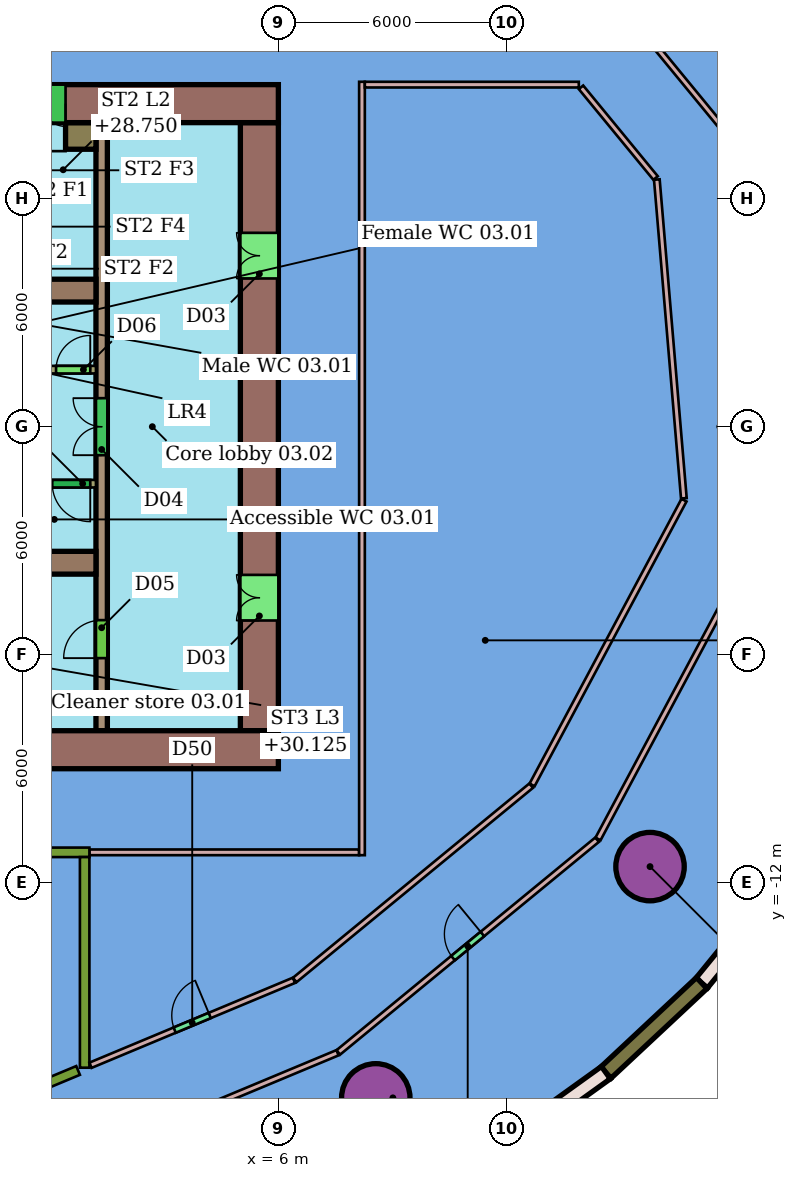
"""IFC4 building model, lengths in metres.
Left out: names, types, materials, properties, quantities, classifications, styles, units other than length and angle.
Written with IfcOpenShell. Run it as: python <this file> out.ifc"""

import sys

from ifc_helpers import new_model, si_unit, direction, frame, frame_2d, origin, origin_2d, place, context, subcontext, project, spatial, rectangle, hollow_circle, extrude, element, fill, save


model = new_model("IFC4")
c1 = context("Model", 3, precision=1e-05, world=origin(), true_north=direction((0.0, 1.0)))
c2 = subcontext(c1, "Body", "Model", "MODEL_VIEW")
j1 = project(units=[si_unit("LENGTHUNIT", "METRE"), si_unit("PLANEANGLEUNIT", "RADIAN")], contexts=[c1])
p1 = place(None, origin())
s1 = spatial("IfcSite", under=j1, at=p1, CompositionType="ELEMENT")
p2 = place(p1, origin())
s2 = spatial("IfcBuilding", under=s1, at=p2, CompositionType="ELEMENT")
p3 = place(p2, frame((0.0, 0.0, 26.0)))
s3 = spatial("IfcBuildingStorey", under=s2, at=p3, CompositionType="ELEMENT", Elevation=26.0)
for number, where, z_axis, x_axis in (
    (1, (8.563, -17.66, 0.0), (0.0, 0.0, 1.0), (1.0, 0.0, 0.0)),
    (2, (15.78, -11.576, 0.0), (0.0, 0.0, 1.0), (1.0, 0.0, 0.0)),
):
    element("IfcColumn", number, at=place(p3, frame(where, z_axis=z_axis, x_axis=x_axis)), inside=s3, PredefinedType="COLUMN", context=c2, shape_type="SweptSolid", body=[
        extrude(hollow_circle(Radius=0.9, WallThickness=0.06, at=origin_2d()), origin(), (0.0, 0.0, 1.0), 5.3),
    ])
p4 = place(p3, frame((1.027, -11.2, 0.0), z_axis=(0.0, 0.0, 1.0), x_axis=(1.0, 0.0, 0.0)))
e3 = element("IfcWall", 3, at=p4, inside=s3, PredefinedType="PARTITIONING", context=c2, shape_type="SweptSolid", body=[
    extrude(rectangle(XDim=7.098, YDim=0.15, at=frame_2d((3.549, 0.0))), origin(), (0.0, 0.0, 1.0), 4.6),
])
p5 = place(p3, frame((-8.223, -11.2, 0.0), z_axis=(0.0, 0.0, 1.0), x_axis=(1.0, 0.0, 0.0)))
e4 = element("IfcWall", 4, at=p5, inside=s3, PredefinedType="PARTITIONING", context=c2, shape_type="SweptSolid", body=[
    extrude(rectangle(XDim=9.25, YDim=0.25, at=frame_2d((4.625, 0.0))), origin(), (0.0, 0.0, 1.0), 4.6),
])
p6 = place(p3, frame((8.2, -11.275, 0.0), z_axis=(0.0, 0.0, 1.0), x_axis=(0.0, 1.0, 0.0)))
e5 = element("IfcWall", 5, at=p6, inside=s3, PredefinedType="PARTITIONING", context=c2, shape_type="SweptSolid", body=[
    extrude(rectangle(XDim=20.35, YDim=0.15, at=frame_2d((10.175, 0.0))), origin(), (0.0, 0.0, 1.0), 4.6),
])
p7 = place(p3, frame((8.275, 9.0, 0.0), z_axis=(0.0, 0.0, 1.0), x_axis=(1.0, 0.0, 0.0)))
e6 = element("IfcWall", 6, at=p7, inside=s3, PredefinedType="PARTITIONING", context=c2, shape_type="SweptSolid", body=[
    extrude(rectangle(XDim=5.631, YDim=0.15, at=frame_2d((2.815, 0.0))), origin(), (0.0, 0.0, 1.0), 4.6),
])
p8 = place(p3, frame((13.964, 8.929, 0.0), z_axis=(0.0, 0.0, 1.0), x_axis=(0.635017397711, -0.772497834692, 0.0)))
e7 = element("IfcWall", 7, at=p8, inside=s3, PredefinedType="PARTITIONING", context=c2, shape_type="SweptSolid", body=[
    extrude(rectangle(XDim=3.09, YDim=0.15, at=frame_2d((1.545, 0.0))), origin(), (0.0, 0.0, 1.0), 4.6),
])
p9 = place(p3, frame((0.903, -16.867, 0.0), z_axis=(0.0, 0.0, 1.0), x_axis=(0.0, 1.0, 0.0)))
e8 = element("IfcWall", 8, at=p9, inside=s3, PredefinedType="PARTITIONING", context=c2, shape_type="SweptSolid", body=[
    extrude(rectangle(XDim=5.542, YDim=0.25, at=frame_2d((2.771, 0.0))), origin(), (0.0, 0.0, 1.0), 4.6),
])
p10 = place(p3, frame((-0.52, -17.461, 0.0), z_axis=(0.0, 0.0, 1.0), x_axis=(0.922788606811, 0.38530661445, 0.0)))
e9 = element("IfcWall", 9, at=p10, inside=s3, PredefinedType="PARTITIONING", context=c2, shape_type="SweptSolid", body=[
    extrude(rectangle(XDim=1.354, YDim=0.25, at=frame_2d((0.677, 0.0))), origin(), (0.0, 0.0, 1.0), 4.6),
])
p11 = place(p3, frame((1.057, -16.802, 0.0), z_axis=(0.0, 0.0, 1.0), x_axis=(0.922820205479, 0.385230928612, 0.0)))
e10 = element("IfcWall", 10, at=p11, inside=s3, PredefinedType="PARTITIONING", context=c2, shape_type="SweptSolid", body=[
    extrude(rectangle(XDim=5.801, YDim=0.15, at=frame_2d((2.9, 0.0))), origin(), (0.0, 0.0, 1.0), 4.6),
])
p12 = place(p11, frame((2.4, 0.0, 0.0)))
e11 = element("IfcOpeningElement", 11, at=p12, cuts=e10, PredefinedType="OPENING", context=c2, shape_type="SweptSolid", body=[
    extrude(rectangle(XDim=1.0, YDim=2.1, at=frame_2d((0.5, 1.05))), frame((0.0, 0.085, 0.0), z_axis=(0.0, -1.0, 0.0), x_axis=(1.0, 0.0, 0.0)), (0.0, 0.0, 1.0), 0.17),
])
p13 = place(p3, frame((15.959, 6.502, 0.0), z_axis=(0.0, 0.0, 1.0), x_axis=(0.084490422104, -0.99642429144, 0.0)))
e12 = element("IfcWall", 12, at=p13, inside=s3, PredefinedType="PARTITIONING", context=c2, shape_type="SweptSolid", body=[
    extrude(rectangle(XDim=8.417, YDim=0.15, at=frame_2d((4.208, 0.0))), origin(), (0.0, 0.0, 1.0), 4.6),
])
p14 = place(p3, frame((12.676, -9.427, 0.0), z_axis=(0.0, 0.0, 1.0), x_axis=(0.470743396375, 0.882270171076, 0.0)))
e13 = element("IfcWall", 13, at=p14, inside=s3, PredefinedType="PARTITIONING", context=c2, shape_type="SweptSolid", body=[
    extrude(rectangle(XDim=8.493, YDim=0.15, at=frame_2d((4.247, 0.0))), origin(), (0.0, 0.0, 1.0), 4.6),
])
p15 = place(p3, frame((6.431, -14.559, 0.0), z_axis=(0.0, 0.0, 1.0), x_axis=(0.772569565922, 0.634930126716, 0.0)))
e14 = element("IfcWall", 14, at=p15, inside=s3, PredefinedType="PARTITIONING", context=c2, shape_type="SweptSolid", body=[
    extrude(rectangle(XDim=8.053, YDim=0.15, at=frame_2d((4.026, 0.0))), origin(), (0.0, 0.0, 1.0), 4.6),
])
p16 = place(p3, frame((18.06, 7.411, 0.0), z_axis=(0.0, 0.0, 1.0), x_axis=(-0.63502168635, 0.772494309277, 0.0)))
e15 = element("IfcWall", 15, at=p16, inside=s3, PredefinedType="PARTITIONING", context=c2, shape_type="SweptSolid", body=[
    extrude(rectangle(XDim=9.59, YDim=0.15, at=frame_2d((4.795, 0.0))), origin(), (0.0, 0.0, 1.0), 4.6),
])
p17 = place(p16, frame((4.195, 0.0, 0.0)))
e16 = element("IfcOpeningElement", 16, at=p17, cuts=e15, PredefinedType="OPENING", context=c2, shape_type="SweptSolid", body=[
    extrude(rectangle(XDim=1.2, YDim=2.1, at=frame_2d((0.6, 1.05))), frame((0.0, 0.085, 0.0), z_axis=(0.0, -1.0, 0.0), x_axis=(1.0, 0.0, 0.0)), (0.0, 0.0, 1.0), 0.17),
])
p18 = place(p3, frame((0.004, -19.626, 0.0), z_axis=(0.0, 0.0, 1.0), x_axis=(0.922818121352, 0.385235921097, 0.0)))
e17 = element("IfcWall", 17, at=p18, inside=s3, PredefinedType="PARTITIONING", context=c2, shape_type="SweptSolid", body=[
    extrude(rectangle(XDim=8.184, YDim=0.15, at=frame_2d((4.092, 0.0))), origin(), (0.0, 0.0, 1.0), 4.6),
])
p19 = place(p3, frame((7.577, -16.465, 0.0), z_axis=(0.0, 0.0, 1.0), x_axis=(0.772575830308, 0.634922504266, 0.0)))
e18 = element("IfcWall", 18, at=p19, inside=s3, PredefinedType="PARTITIONING", context=c2, shape_type="SweptSolid", body=[
    extrude(rectangle(XDim=8.815, YDim=0.15, at=frame_2d((4.407, 0.0))), origin(), (0.0, 0.0, 1.0), 4.6),
])
p20 = place(p19, frame((3.907, 0.0, 0.0)))
e19 = element("IfcOpeningElement", 19, at=p20, cuts=e18, PredefinedType="OPENING", context=c2, shape_type="SweptSolid", body=[
    extrude(rectangle(XDim=1.0, YDim=2.1, at=frame_2d((0.5, 1.05))), frame((0.0, 0.085, 0.0), z_axis=(0.0, -1.0, 0.0), x_axis=(1.0, 0.0, 0.0)), (0.0, 0.0, 1.0), 0.17),
])
p21 = place(p3, frame((14.411, -10.848, 0.0), z_axis=(0.0, 0.0, 1.0), x_axis=(0.470742429837, 0.88227068678, 0.0)))
e20 = element("IfcWall", 20, at=p21, inside=s3, PredefinedType="PARTITIONING", context=c2, shape_type="SweptSolid", body=[
    extrude(rectangle(XDim=9.532, YDim=0.15, at=frame_2d((4.766, 0.0))), origin(), (0.0, 0.0, 1.0), 4.6),
])
p22 = place(p3, frame((19.268, -12.03, 0.0), z_axis=(0.0, 0.0, 1.0), x_axis=(-0.631953724698, -0.775006122453, 0.0)))
e21 = element("IfcWall", 21, at=p22, inside=s3, PredefinedType="SOLIDWALL", context=c2, shape_type="SweptSolid", body=[
    extrude(rectangle(XDim=3.367, YDim=0.4, at=frame_2d((1.684, 0.0))), origin(), (0.0, 0.0, 1.0), 4.9),
])
p23 = place(p3, frame((17.14, -14.64, 0.0), z_axis=(0.0, 0.0, 1.0), x_axis=(-0.730641209912, -0.682761614605, 0.0)))
e22 = element("IfcWall", 22, at=p23, inside=s3, PredefinedType="SOLIDWALL", context=c2, shape_type="SweptSolid", body=[
    extrude(rectangle(XDim=3.452, YDim=0.4, at=frame_2d((1.726, 0.0))), origin(), (0.0, 0.0, 1.0), 5.3),
])
p24 = place(p3, frame((14.618, -16.997, 0.0), z_axis=(0.0, 0.0, 1.0), x_axis=(-0.81205624831, -0.583579171648, 0.0)))
e23 = element("IfcWall", 23, at=p24, inside=s3, PredefinedType="SOLIDWALL", context=c2, shape_type="SweptSolid", body=[
    extrude(rectangle(XDim=3.538, YDim=0.4, at=frame_2d((1.769, 0.0))), origin(), (0.0, 0.0, 1.0), 4.9),
])
p25 = place(p3, frame((6.0, 8.5, 0.0), z_axis=(0.0, 0.0, 1.0), x_axis=(-1.0, 0.0, 0.0)))
e24 = element("IfcWall", 24, at=p25, inside=s3, PredefinedType="SHEAR", context=c2, shape_type="SweptSolid", body=[
    extrude(rectangle(XDim=12.0, YDim=1.0, at=frame_2d((6.0, 0.0))), origin(), (0.0, 0.0, 1.0), 5.2),
])
p26 = place(p25, frame((5.6, 0.0, 0.0)))
e25 = element("IfcOpeningElement", 25, at=p26, cuts=e24, PredefinedType="OPENING", context=c2, shape_type="SweptSolid", body=[
    extrude(rectangle(XDim=1.2, YDim=2.1, at=frame_2d((0.6, 1.05))), frame((0.0, 0.51, 0.0), z_axis=(0.0, -1.0, 0.0), x_axis=(1.0, 0.0, 0.0)), (0.0, 0.0, 1.0), 1.02),
])
p27 = place(p3, frame((-18.0, -8.5, 0.0), z_axis=(0.0, 0.0, 1.0), x_axis=(1.0, 0.0, 0.0)))
e26 = element("IfcWall", 26, at=p27, inside=s3, PredefinedType="SHEAR", context=c2, shape_type="SweptSolid", body=[
    extrude(rectangle(XDim=24.0, YDim=1.0, at=frame_2d((12.0, 0.0))), origin(), (0.0, 0.0, 1.0), 5.2),
])
p28 = place(p27, frame((6.0, 0.0, 0.0)))
e27 = element("IfcOpeningElement", 27, at=p28, cuts=e26, PredefinedType="OPENING", context=c2, shape_type="SweptSolid", body=[
    extrude(rectangle(XDim=1.2, YDim=2.1, at=frame_2d((0.6, 1.05))), frame((0.0, 0.51, 0.0), z_axis=(0.0, -1.0, 0.0), x_axis=(1.0, 0.0, 0.0)), (0.0, 0.0, 1.0), 1.02),
])
p29 = place(p3, frame((5.5, -8.0, 0.0), z_axis=(0.0, 0.0, 1.0), x_axis=(0.0, 1.0, 0.0)))
e28 = element("IfcWall", 28, at=p29, inside=s3, PredefinedType="SHEAR", context=c2, shape_type="SweptSolid", body=[
    extrude(rectangle(XDim=16.0, YDim=1.0, at=frame_2d((8.0, 0.0))), origin(), (0.0, 0.0, 1.0), 5.2),
])
p30 = place(p29, frame((2.9, 0.0, 0.0)))
e29 = element("IfcOpeningElement", 29, at=p30, cuts=e28, PredefinedType="OPENING", context=c2, shape_type="SweptSolid", body=[
    extrude(rectangle(XDim=1.2, YDim=2.1, at=frame_2d((0.6, 1.05))), frame((0.0, 0.51, 0.0), z_axis=(0.0, -1.0, 0.0), x_axis=(1.0, 0.0, 0.0)), (0.0, 0.0, 1.0), 1.02),
])
p31 = place(p29, frame((11.9, 0.0, 0.0)))
e30 = element("IfcOpeningElement", 30, at=p31, cuts=e28, PredefinedType="OPENING", context=c2, shape_type="SweptSolid", body=[
    extrude(rectangle(XDim=1.2, YDim=2.1, at=frame_2d((0.6, 1.05))), frame((0.0, 0.51, 0.0), z_axis=(0.0, -1.0, 0.0), x_axis=(1.0, 0.0, 0.0)), (0.0, 0.0, 1.0), 1.02),
])
for number, where, z_axis, x_axis in (
    (31, (-6.0, 3.58, 0.0), (0.0, 0.0, 1.0), (1.0, 0.0, 0.0)),
    (32, (-6.0, -3.58, 0.0), (0.0, 0.0, 1.0), (1.0, 0.0, 0.0)),
):
    element("IfcWall", number, at=place(p3, frame(where, z_axis=z_axis, x_axis=x_axis)), inside=s3, PredefinedType="SHEAR", context=c2, shape_type="SweptSolid", body=[
        extrude(rectangle(XDim=7.2, YDim=0.6, at=frame_2d((3.6, 0.0))), origin(), (0.0, 0.0, 1.0), 5.2),
    ])
p32 = place(p3, frame((1.35, -8.0, 0.0), z_axis=(0.0, 0.0, 1.0), x_axis=(0.0, 1.0, 0.0)))
e33 = element("IfcWall", 33, at=p32, inside=s3, PredefinedType="SHEAR", context=c2, shape_type="SweptSolid", body=[
    extrude(rectangle(XDim=16.0, YDim=0.3, at=frame_2d((8.0, 0.0))), origin(), (0.0, 0.0, 1.0), 5.2),
])
p33 = place(p32, frame((1.91, 0.0, 0.0)))
e34 = element("IfcOpeningElement", 34, at=p33, cuts=e33, PredefinedType="OPENING", context=c2, shape_type="SweptSolid", body=[
    extrude(rectangle(XDim=1.0, YDim=2.1, at=frame_2d((0.5, 1.05))), frame((0.0, 0.16, 0.0), z_axis=(0.0, -1.0, 0.0), x_axis=(1.0, 0.0, 0.0)), (0.0, 0.0, 1.0), 0.32),
])
p34 = place(p32, frame((7.25, 0.0, 0.0)))
e35 = element("IfcOpeningElement", 35, at=p34, cuts=e33, PredefinedType="OPENING", context=c2, shape_type="SweptSolid", body=[
    extrude(rectangle(XDim=1.5, YDim=2.1, at=frame_2d((0.75, 1.05))), frame((0.0, 0.16, 0.0), z_axis=(0.0, -1.0, 0.0), x_axis=(1.0, 0.0, 0.0)), (0.0, 0.0, 1.0), 0.32),
])
p35 = place(p3, frame((-13.2, 1.5, 0.0), z_axis=(0.0, 0.0, 1.0), x_axis=(1.0, 0.0, 0.0)))
e36 = element("IfcWall", 36, at=p35, inside=s3, PredefinedType="SHEAR", context=c2, shape_type="SweptSolid", body=[
    extrude(rectangle(XDim=14.4, YDim=0.2, at=frame_2d((7.2, 0.0))), origin(), (0.0, 0.0, 1.0), 5.2),
])
p36 = place(p35, frame((0.546, 0.0, 0.0)))
e37 = element("IfcOpeningElement", 37, at=p36, cuts=e36, PredefinedType="OPENING", context=c2, shape_type="SweptSolid", body=[
    extrude(rectangle(XDim=1.1, YDim=2.1, at=frame_2d((0.55, 1.05))), frame((0.0, 0.11, 0.0), z_axis=(0.0, -1.0, 0.0), x_axis=(1.0, 0.0, 0.0)), (0.0, 0.0, 1.0), 0.22),
])
p37 = place(p35, frame((2.988, 0.0, 0.0)))
e38 = element("IfcOpeningElement", 38, at=p37, cuts=e36, PredefinedType="OPENING", context=c2, shape_type="SweptSolid", body=[
    extrude(rectangle(XDim=1.1, YDim=2.1, at=frame_2d((0.55, 1.05))), frame((0.0, 0.11, 0.0), z_axis=(0.0, -1.0, 0.0), x_axis=(1.0, 0.0, 0.0)), (0.0, 0.0, 1.0), 0.22),
])
p38 = place(p35, frame((5.429, 0.0, 0.0)))
e39 = element("IfcOpeningElement", 39, at=p38, cuts=e36, PredefinedType="OPENING", context=c2, shape_type="SweptSolid", body=[
    extrude(rectangle(XDim=1.1, YDim=2.1, at=frame_2d((0.55, 1.05))), frame((0.0, 0.11, 0.0), z_axis=(0.0, -1.0, 0.0), x_axis=(1.0, 0.0, 0.0)), (0.0, 0.0, 1.0), 0.22),
])
p39 = place(p35, frame((7.871, 0.0, 0.0)))
e40 = element("IfcOpeningElement", 40, at=p39, cuts=e36, PredefinedType="OPENING", context=c2, shape_type="SweptSolid", body=[
    extrude(rectangle(XDim=1.1, YDim=2.1, at=frame_2d((0.55, 1.05))), frame((0.0, 0.11, 0.0), z_axis=(0.0, -1.0, 0.0), x_axis=(1.0, 0.0, 0.0)), (0.0, 0.0, 1.0), 0.22),
])
p40 = place(p35, frame((10.958, 0.0, 0.0)))
e41 = element("IfcOpeningElement", 41, at=p40, cuts=e36, PredefinedType="OPENING", context=c2, shape_type="SweptSolid", body=[
    extrude(rectangle(XDim=0.9, YDim=2.1, at=frame_2d((0.45, 1.05))), frame((0.0, 0.11, 0.0), z_axis=(0.0, -1.0, 0.0), x_axis=(1.0, 0.0, 0.0)), (0.0, 0.0, 1.0), 0.22),
])
p41 = place(p35, frame((13.35, 0.0, 0.0)))
e42 = element("IfcOpeningElement", 42, at=p41, cuts=e36, PredefinedType="OPENING", context=c2, shape_type="SweptSolid", body=[
    extrude(rectangle(XDim=0.9, YDim=2.1, at=frame_2d((0.45, 1.05))), frame((0.0, 0.11, 0.0), z_axis=(0.0, -1.0, 0.0), x_axis=(1.0, 0.0, 0.0)), (0.0, 0.0, 1.0), 0.22),
])
p42 = place(p3, frame((1.2, -1.5, 0.0), z_axis=(0.0, 0.0, 1.0), x_axis=(-1.0, 0.0, 0.0)))
e43 = element("IfcWall", 43, at=p42, inside=s3, PredefinedType="SHEAR", context=c2, shape_type="SweptSolid", body=[
    extrude(rectangle(XDim=14.4, YDim=0.2, at=frame_2d((7.2, 0.0))), origin(), (0.0, 0.0, 1.0), 5.2),
])
p43 = place(p42, frame((7.821, 0.0, 0.0)))
e44 = element("IfcOpeningElement", 44, at=p43, cuts=e43, PredefinedType="OPENING", context=c2, shape_type="SweptSolid", body=[
    extrude(rectangle(XDim=1.2, YDim=2.1, at=frame_2d((0.6, 1.05))), frame((0.0, 0.11, 0.0), z_axis=(0.0, -1.0, 0.0), x_axis=(1.0, 0.0, 0.0)), (0.0, 0.0, 1.0), 0.22),
])
p44 = place(p42, frame((0.15, 0.0, 0.0)))
e45 = element("IfcOpeningElement", 45, at=p44, cuts=e43, PredefinedType="OPENING", context=c2, shape_type="SweptSolid", body=[
    extrude(rectangle(XDim=1.0, YDim=2.1, at=frame_2d((0.5, 1.05))), frame((0.0, 0.11, 0.0), z_axis=(0.0, -1.0, 0.0), x_axis=(1.0, 0.0, 0.0)), (0.0, 0.0, 1.0), 0.22),
])
p45 = place(p3, frame((0.4, 7.65, 0.0), z_axis=(0.0, 0.0, 1.0), x_axis=(1.0, 0.0, 0.0)))
e46 = element("IfcWall", 46, at=p45, inside=s3, PredefinedType="SHEAR", context=c2, shape_type="SweptSolid", body=[
    extrude(rectangle(XDim=0.8, YDim=0.7, at=frame_2d((0.4, 0.0))), origin(), (0.0, 0.0, 1.0), 5.2),
])
p46 = place(p12, origin())
e47 = element("IfcDoor", 47, at=p46, inside=s3, OperationType="SINGLE_SWING_RIGHT", PredefinedType="DOOR", context=c2, shape_type="SweptSolid", body=[
    extrude(rectangle(XDim=1.0, YDim=2.1, at=frame_2d((0.5, 1.05))), frame((0.0, 0.025, 0.0), z_axis=(0.0, -1.0, 0.0), x_axis=(1.0, 0.0, 0.0)), (0.0, 0.0, 1.0), 0.05),
])
fill(e11, e47)
p47 = place(p20, origin())
e48 = element("IfcDoor", 48, at=p47, inside=s3, OperationType="SINGLE_SWING_RIGHT", PredefinedType="DOOR", context=c2, shape_type="SweptSolid", body=[
    extrude(rectangle(XDim=1.0, YDim=2.1, at=frame_2d((0.5, 1.05))), frame((0.0, 0.025, 0.0), z_axis=(0.0, -1.0, 0.0), x_axis=(1.0, 0.0, 0.0)), (0.0, 0.0, 1.0), 0.05),
])
fill(e19, e48)
p48 = place(p26, origin())
e49 = element("IfcDoor", 49, at=p48, inside=s3, OperationType="DOUBLE_DOOR_SINGLE_SWING", PredefinedType="NOTDEFINED", context=c2, shape_type="SweptSolid", body=[
    extrude(rectangle(XDim=1.2, YDim=2.1, at=frame_2d((0.6, 1.05))), frame((0.0, 0.025, 0.0), z_axis=(0.0, -1.0, 0.0), x_axis=(1.0, 0.0, 0.0)), (0.0, 0.0, 1.0), 0.05),
])
fill(e25, e49)
p49 = place(p30, origin())
e50 = element("IfcDoor", 50, at=p49, inside=s3, OperationType="DOUBLE_DOOR_SINGLE_SWING", PredefinedType="NOTDEFINED", context=c2, shape_type="SweptSolid", body=[
    extrude(rectangle(XDim=1.2, YDim=2.1, at=frame_2d((0.6, 1.05))), frame((0.0, 0.025, 0.0), z_axis=(0.0, -1.0, 0.0), x_axis=(1.0, 0.0, 0.0)), (0.0, 0.0, 1.0), 0.05),
])
fill(e29, e50)
p50 = place(p31, origin())
e51 = element("IfcDoor", 51, at=p50, inside=s3, OperationType="DOUBLE_DOOR_SINGLE_SWING", PredefinedType="NOTDEFINED", context=c2, shape_type="SweptSolid", body=[
    extrude(rectangle(XDim=1.2, YDim=2.1, at=frame_2d((0.6, 1.05))), frame((0.0, 0.025, 0.0), z_axis=(0.0, -1.0, 0.0), x_axis=(1.0, 0.0, 0.0)), (0.0, 0.0, 1.0), 0.05),
])
fill(e30, e51)
p51 = place(p33, origin())
e52 = element("IfcDoor", 52, at=p51, inside=s3, OperationType="SINGLE_SWING_LEFT", PredefinedType="NOTDEFINED", context=c2, shape_type="SweptSolid", body=[
    extrude(rectangle(XDim=1.0, YDim=2.1, at=frame_2d((0.5, 1.05))), frame((0.0, 0.025, 0.0), z_axis=(0.0, -1.0, 0.0), x_axis=(1.0, 0.0, 0.0)), (0.0, 0.0, 1.0), 0.05),
])
fill(e34, e52)
p52 = place(p34, origin())
e53 = element("IfcDoor", 53, at=p52, inside=s3, OperationType="DOUBLE_DOOR_SINGLE_SWING", PredefinedType="NOTDEFINED", context=c2, shape_type="SweptSolid", body=[
    extrude(rectangle(XDim=1.5, YDim=2.1, at=frame_2d((0.75, 1.05))), frame((0.0, 0.025, 0.0), z_axis=(0.0, -1.0, 0.0), x_axis=(1.0, 0.0, 0.0)), (0.0, 0.0, 1.0), 0.05),
])
fill(e35, e53)
p53 = place(p41, origin())
e54 = element("IfcDoor", 54, at=p53, inside=s3, OperationType="SINGLE_SWING_RIGHT", PredefinedType="NOTDEFINED", context=c2, shape_type="SweptSolid", body=[
    extrude(rectangle(XDim=0.9, YDim=2.1, at=frame_2d((0.45, 1.05))), frame((0.0, 0.025, 0.0), z_axis=(0.0, -1.0, 0.0), x_axis=(1.0, 0.0, 0.0)), (0.0, 0.0, 1.0), 0.05),
])
fill(e42, e54)
p54 = place(p44, origin())
e55 = element("IfcDoor", 55, at=p54, inside=s3, OperationType="SINGLE_SWING_LEFT", PredefinedType="NOTDEFINED", context=c2, shape_type="SweptSolid", body=[
    extrude(rectangle(XDim=1.0, YDim=2.1, at=frame_2d((0.5, 1.05))), frame((0.0, 0.025, 0.0), z_axis=(0.0, -1.0, 0.0), x_axis=(1.0, 0.0, 0.0)), (0.0, 0.0, 1.0), 0.05),
])
fill(e45, e55)
save(model, sys.argv[1])
